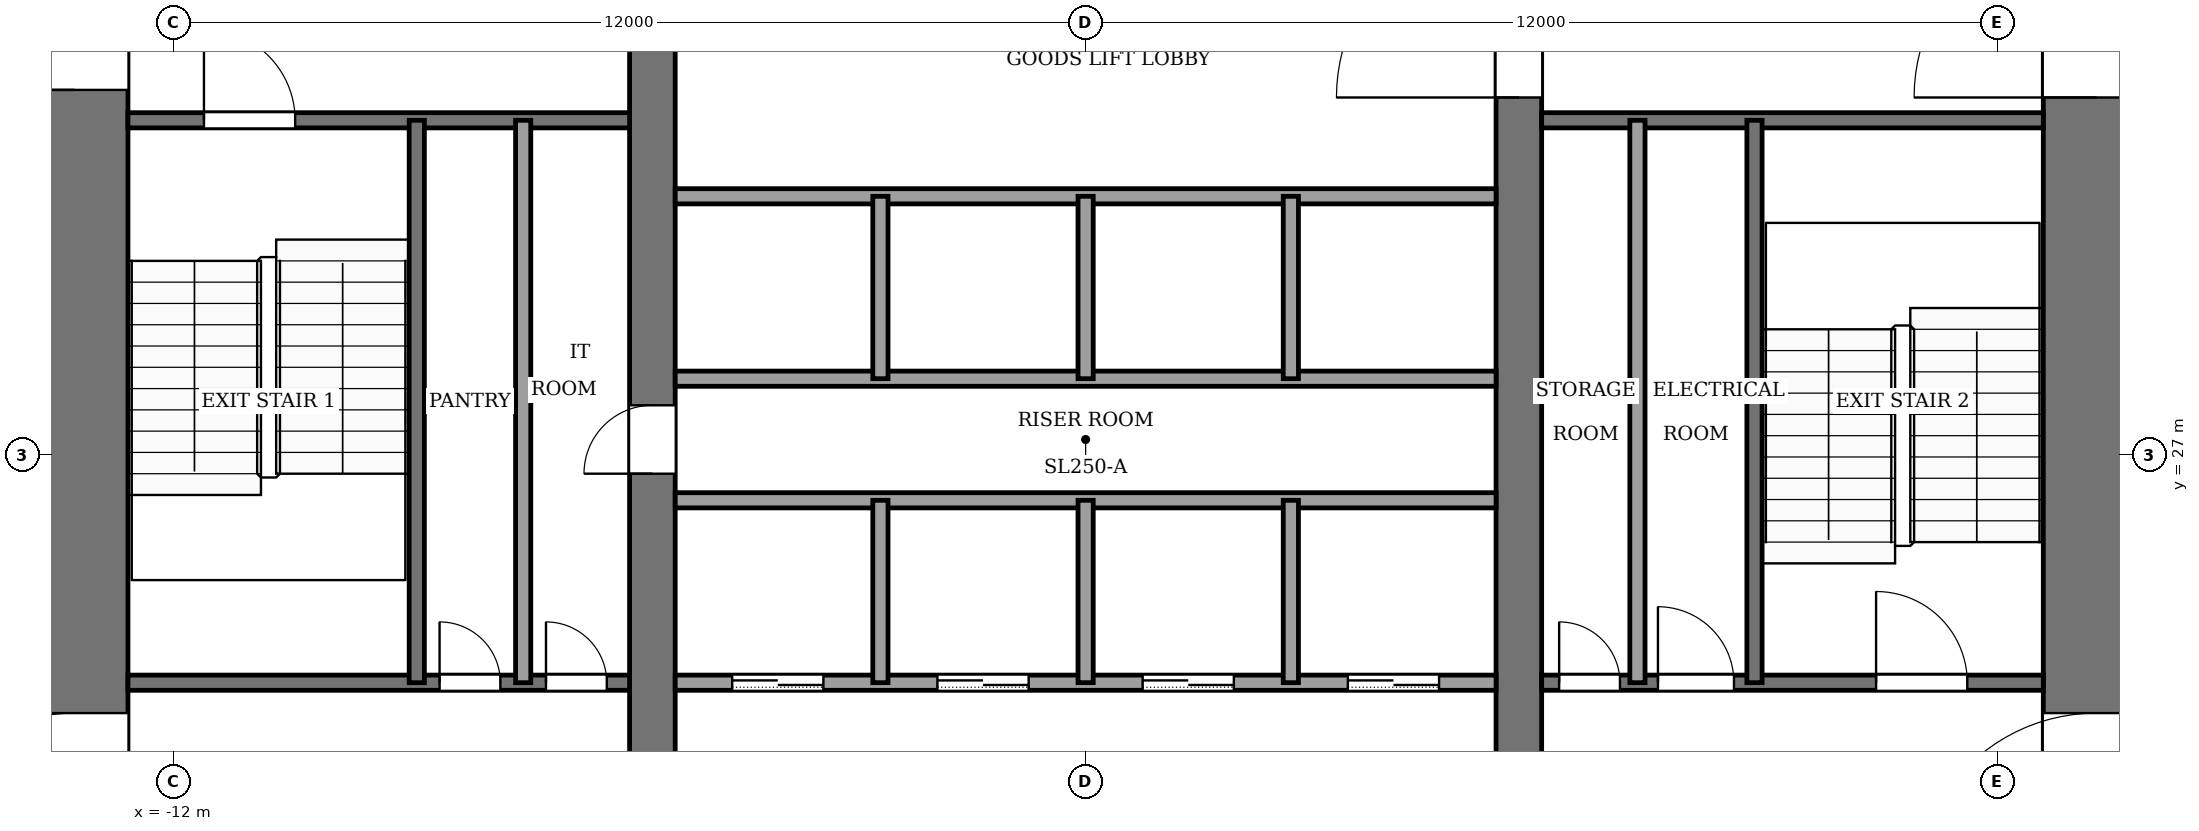
"""IFC4 building model, lengths in metres.
Left out: names, types, materials, properties, quantities, classifications, styles, units other than length and angle.
Written with IfcOpenShell. Run it as: python <this file> out.ifc"""

import sys

from ifc_helpers import new_model, si_unit, direction, frame, frame_2d, origin, place, context, subcontext, project, spatial, rectangle, extrude, element, fill, save


model = new_model("IFC4")
c1 = context("Model", 3, precision=1e-05, world=origin(), true_north=direction((0.0, 1.0)))
c2 = subcontext(c1, "Body", "Model", "MODEL_VIEW")
j1 = project(units=[si_unit("LENGTHUNIT", "METRE"), si_unit("PLANEANGLEUNIT", "RADIAN")], contexts=[c1])
p1 = place(None, origin())
s1 = spatial("IfcSite", under=j1, at=p1, CompositionType="ELEMENT")
p2 = place(p1, origin())
s2 = spatial("IfcBuilding", under=s1, at=p2, CompositionType="ELEMENT")
p3 = place(p2, frame((0.0, 0.0, 30.0)))
s3 = spatial("IfcBuildingStorey", under=s2, at=p3, CompositionType="ELEMENT", Elevation=30.0)
p4 = place(p3, frame((-13.3, 18.4, -0.13), z_axis=(0.0, 0.0, 1.0), x_axis=(0.0, 1.0, 0.0)))
e1 = element("IfcWall", 1, at=p4, inside=s3, PredefinedType="SHEAR", context=c2, shape_type="SweptSolid", body=[
    extrude(rectangle(XDim=19.2, YDim=1.4, at=frame_2d((9.6, 0.0))), origin(), (0.0, 0.0, 1.0), 4.0),
])
p5 = place(p4, frame((2.8, 0.0, 0.13)))
e2 = element("IfcOpeningElement", 2, at=p5, cuts=e1, PredefinedType="OPENING", context=c2, shape_type="SweptSolid", body=[
    extrude(rectangle(XDim=2.4, YDim=2.4, at=frame_2d((1.2, 1.2))), frame((0.0, 0.71, 0.0), z_axis=(0.0, -1.0, 0.0), x_axis=(1.0, 0.0, 0.0)), (0.0, 0.0, 1.0), 1.42),
])
p6 = place(p4, frame((13.4, 0.0, 0.13)))
e3 = element("IfcOpeningElement", 3, at=p6, cuts=e1, PredefinedType="OPENING", context=c2, shape_type="SweptSolid", body=[
    extrude(rectangle(XDim=1.4, YDim=2.2, at=frame_2d((0.7, 1.1))), frame((0.0, 0.71, 0.0), z_axis=(0.0, -1.0, 0.0), x_axis=(1.0, 0.0, 0.0)), (0.0, 0.0, 1.0), 1.42),
])
p7 = place(p3, frame((13.3, 18.4, -0.13), z_axis=(0.0, 0.0, 1.0), x_axis=(0.0, 1.0, 0.0)))
e4 = element("IfcWall", 4, at=p7, inside=s3, PredefinedType="SHEAR", context=c2, shape_type="SweptSolid", body=[
    extrude(rectangle(XDim=19.2, YDim=1.4, at=frame_2d((9.6, 0.0))), origin(), (0.0, 0.0, 1.0), 4.0),
])
p8 = place(p7, frame((2.8, 0.0, 0.13)))
e5 = element("IfcOpeningElement", 5, at=p8, cuts=e4, PredefinedType="OPENING", context=c2, shape_type="SweptSolid", body=[
    extrude(rectangle(XDim=2.4, YDim=2.4, at=frame_2d((1.2, 1.2))), frame((0.0, 0.71, 0.0), z_axis=(0.0, -1.0, 0.0), x_axis=(1.0, 0.0, 0.0)), (0.0, 0.0, 1.0), 1.42),
])
p9 = place(p7, frame((13.3, 0.0, 0.13)))
e6 = element("IfcOpeningElement", 6, at=p9, cuts=e4, PredefinedType="OPENING", context=c2, shape_type="SweptSolid", body=[
    extrude(rectangle(XDim=2.4, YDim=2.4, at=frame_2d((1.2, 1.2))), frame((0.0, 0.71, 0.0), z_axis=(0.0, -1.0, 0.0), x_axis=(1.0, 0.0, 0.0)), (0.0, 0.0, 1.0), 1.42),
])
p10 = place(p3, frame((-5.7, 18.4, -0.13), z_axis=(0.0, 0.0, 1.0), x_axis=(0.0, 1.0, 0.0)))
e7 = element("IfcWall", 7, at=p10, inside=s3, PredefinedType="SHEAR", context=c2, shape_type="SweptSolid", body=[
    extrude(rectangle(XDim=19.2, YDim=0.6, at=frame_2d((9.6, 0.0))), origin(), (0.0, 0.0, 1.0), 4.0),
])
p11 = place(p10, frame((8.35, 0.0, 0.13)))
e8 = element("IfcOpeningElement", 8, at=p11, cuts=e7, PredefinedType="OPENING", context=c2, shape_type="SweptSolid", body=[
    extrude(rectangle(XDim=0.9, YDim=2.1, at=frame_2d((0.45, 1.05))), frame((0.0, 0.31, 0.0), z_axis=(0.0, -1.0, 0.0), x_axis=(1.0, 0.0, 0.0)), (0.0, 0.0, 1.0), 0.62),
])
p12 = place(p3, frame((5.7, 18.4, -0.13), z_axis=(0.0, 0.0, 1.0), x_axis=(0.0, 1.0, 0.0)))
e9 = element("IfcWall", 9, at=p12, inside=s3, PredefinedType="SHEAR", context=c2, shape_type="SweptSolid", body=[
    extrude(rectangle(XDim=19.2, YDim=0.6, at=frame_2d((9.6, 0.0))), origin(), (0.0, 0.0, 1.0), 4.0),
])
p13 = place(p12, frame((13.3, 0.0, 0.13)))
e10 = element("IfcOpeningElement", 10, at=p13, cuts=e9, PredefinedType="OPENING", context=c2, shape_type="SweptSolid", body=[
    extrude(rectangle(XDim=2.4, YDim=2.4, at=frame_2d((1.2, 1.2))), frame((0.0, 0.31, 0.0), z_axis=(0.0, -1.0, 0.0), x_axis=(1.0, 0.0, 0.0)), (0.0, 0.0, 1.0), 0.62),
])
p14 = place(p3, frame((-12.6, 24.0, 0.0), z_axis=(0.0, 0.0, 1.0), x_axis=(1.0, 0.0, 0.0)))
e11 = element("IfcWall", 11, at=p14, inside=s3, PredefinedType="PARTITIONING", context=c2, shape_type="SweptSolid", body=[
    extrude(rectangle(XDim=6.6, YDim=0.2, at=frame_2d((3.3, 0.0))), origin(), (0.0, 0.0, 1.0), 3.87),
])
p15 = place(p14, frame((4.1, 0.0, 0.0)))
e12 = element("IfcOpeningElement", 12, at=p15, cuts=e11, PredefinedType="OPENING", context=c2, shape_type="SweptSolid", body=[
    extrude(rectangle(XDim=0.8, YDim=2.1, at=frame_2d((0.4, 1.05))), frame((0.0, 0.11, 0.0), z_axis=(0.0, -1.0, 0.0), x_axis=(1.0, 0.0, 0.0)), (0.0, 0.0, 1.0), 0.22),
])
p16 = place(p14, frame((5.5, 0.0, 0.0)))
e13 = element("IfcOpeningElement", 13, at=p16, cuts=e11, PredefinedType="OPENING", context=c2, shape_type="SweptSolid", body=[
    extrude(rectangle(XDim=0.8, YDim=2.1, at=frame_2d((0.4, 1.05))), frame((0.0, 0.11, 0.0), z_axis=(0.0, -1.0, 0.0), x_axis=(1.0, 0.0, 0.0)), (0.0, 0.0, 1.0), 0.22),
])
p17 = place(p3, frame((-5.4, 24.0, 0.0), z_axis=(0.0, 0.0, 1.0), x_axis=(1.0, 0.0, 0.0)))
e14 = element("IfcWall", 14, at=p17, inside=s3, PredefinedType="PARTITIONING", context=c2, shape_type="SweptSolid", body=[
    extrude(rectangle(XDim=10.8, YDim=0.2, at=frame_2d((5.4, 0.0))), origin(), (0.0, 0.0, 1.0), 3.87),
])
p18 = place(p17, frame((0.75, 0.0, 0.0)))
e15 = element("IfcOpeningElement", 15, at=p18, cuts=e14, PredefinedType="OPENING", context=c2, shape_type="SweptSolid", body=[
    extrude(rectangle(XDim=1.2, YDim=2.2, at=frame_2d((0.6, 1.1))), frame((0.0, 0.11, 0.0), z_axis=(0.0, -1.0, 0.0), x_axis=(1.0, 0.0, 0.0)), (0.0, 0.0, 1.0), 0.22),
])
p19 = place(p17, frame((3.45, 0.0, 0.0)))
e16 = element("IfcOpeningElement", 16, at=p19, cuts=e14, PredefinedType="OPENING", context=c2, shape_type="SweptSolid", body=[
    extrude(rectangle(XDim=1.2, YDim=2.2, at=frame_2d((0.6, 1.1))), frame((0.0, 0.11, 0.0), z_axis=(0.0, -1.0, 0.0), x_axis=(1.0, 0.0, 0.0)), (0.0, 0.0, 1.0), 0.22),
])
p20 = place(p17, frame((6.15, 0.0, 0.0)))
e17 = element("IfcOpeningElement", 17, at=p20, cuts=e14, PredefinedType="OPENING", context=c2, shape_type="SweptSolid", body=[
    extrude(rectangle(XDim=1.2, YDim=2.2, at=frame_2d((0.6, 1.1))), frame((0.0, 0.11, 0.0), z_axis=(0.0, -1.0, 0.0), x_axis=(1.0, 0.0, 0.0)), (0.0, 0.0, 1.0), 0.22),
])
p21 = place(p17, frame((8.85, 0.0, 0.0)))
e18 = element("IfcOpeningElement", 18, at=p21, cuts=e14, PredefinedType="OPENING", context=c2, shape_type="SweptSolid", body=[
    extrude(rectangle(XDim=1.2, YDim=2.2, at=frame_2d((0.6, 1.1))), frame((0.0, 0.11, 0.0), z_axis=(0.0, -1.0, 0.0), x_axis=(1.0, 0.0, 0.0)), (0.0, 0.0, 1.0), 0.22),
])
p22 = place(p3, frame((6.0, 24.0, 0.0), z_axis=(0.0, 0.0, 1.0), x_axis=(1.0, 0.0, 0.0)))
e19 = element("IfcWall", 19, at=p22, inside=s3, PredefinedType="PARTITIONING", context=c2, shape_type="SweptSolid", body=[
    extrude(rectangle(XDim=6.6, YDim=0.2, at=frame_2d((3.3, 0.0))), origin(), (0.0, 0.0, 1.0), 3.87),
])
p23 = place(p22, frame((0.23, 0.0, 0.0)))
e20 = element("IfcOpeningElement", 20, at=p23, cuts=e19, PredefinedType="OPENING", context=c2, shape_type="SweptSolid", body=[
    extrude(rectangle(XDim=0.8, YDim=2.1, at=frame_2d((0.4, 1.05))), frame((0.0, 0.11, 0.0), z_axis=(0.0, -1.0, 0.0), x_axis=(1.0, 0.0, 0.0)), (0.0, 0.0, 1.0), 0.22),
])
p24 = place(p22, frame((1.53, 0.0, 0.0)))
e21 = element("IfcOpeningElement", 21, at=p24, cuts=e19, PredefinedType="OPENING", context=c2, shape_type="SweptSolid", body=[
    extrude(rectangle(XDim=1.0, YDim=2.1, at=frame_2d((0.5, 1.05))), frame((0.0, 0.11, 0.0), z_axis=(0.0, -1.0, 0.0), x_axis=(1.0, 0.0, 0.0)), (0.0, 0.0, 1.0), 0.22),
])
p25 = place(p22, frame((4.4, 0.0, 0.0)))
e22 = element("IfcOpeningElement", 22, at=p25, cuts=e19, PredefinedType="OPENING", context=c2, shape_type="SweptSolid", body=[
    extrude(rectangle(XDim=1.2, YDim=2.2, at=frame_2d((0.6, 1.1))), frame((0.0, 0.11, 0.0), z_axis=(0.0, -1.0, 0.0), x_axis=(1.0, 0.0, 0.0)), (0.0, 0.0, 1.0), 0.22),
])
for number, where, z_axis, x_axis in (
    (23, (-5.4, 26.4, 0.0), (0.0, 0.0, 1.0), (1.0, 0.0, 0.0)),
    (24, (-5.4, 28.0, 0.0), (0.0, 0.0, 1.0), (1.0, 0.0, 0.0)),
    (25, (-5.4, 30.4, 0.0), (0.0, 0.0, 1.0), (1.0, 0.0, 0.0)),
):
    element("IfcWall", number, at=place(p3, frame(where, z_axis=z_axis, x_axis=x_axis)), inside=s3, PredefinedType="PARTITIONING", context=c2, shape_type="SweptSolid", body=[
        extrude(rectangle(XDim=10.8, YDim=0.2, at=frame_2d((5.4, 0.0))), origin(), (0.0, 0.0, 1.0), 3.87),
    ])
p26 = place(p3, frame((-12.6, 31.4, 0.0), z_axis=(0.0, 0.0, 1.0), x_axis=(1.0, 0.0, 0.0)))
e26 = element("IfcWall", 26, at=p26, inside=s3, PredefinedType="PARTITIONING", context=c2, shape_type="SweptSolid", body=[
    extrude(rectangle(XDim=6.6, YDim=0.2, at=frame_2d((3.3, 0.0))), origin(), (0.0, 0.0, 1.0), 3.87),
])
p27 = place(p26, frame((1.0, 0.0, 0.0)))
e27 = element("IfcOpeningElement", 27, at=p27, cuts=e26, PredefinedType="OPENING", context=c2, shape_type="SweptSolid", body=[
    extrude(rectangle(XDim=1.2, YDim=2.2, at=frame_2d((0.6, 1.1))), frame((0.0, 0.11, 0.0), z_axis=(0.0, -1.0, 0.0), x_axis=(1.0, 0.0, 0.0)), (0.0, 0.0, 1.0), 0.22),
])
p28 = place(p3, frame((6.0, 31.4, 0.0), z_axis=(0.0, 0.0, 1.0), x_axis=(1.0, 0.0, 0.0)))
e28 = element("IfcWall", 28, at=p28, inside=s3, PredefinedType="PARTITIONING", context=c2, shape_type="SweptSolid", body=[
    extrude(rectangle(XDim=6.6, YDim=0.2, at=frame_2d((3.3, 0.0))), origin(), (0.0, 0.0, 1.0), 3.87),
])
for number, where, z_axis, x_axis in (
    (29, (-8.8, 24.0, 0.0), (0.0, 0.0, 1.0), (0.0, 1.0, 0.0)),
    (30, (-7.4, 24.0, 0.0), (0.0, 0.0, 1.0), (0.0, 1.0, 0.0)),
):
    element("IfcWall", number, at=place(p3, frame(where, z_axis=z_axis, x_axis=x_axis)), inside=s3, PredefinedType="PARTITIONING", context=c2, shape_type="SweptSolid", body=[
        extrude(rectangle(XDim=7.4, YDim=0.2, at=frame_2d((3.7, 0.0))), origin(), (0.0, 0.0, 1.0), 3.87),
    ])
for number, where, z_axis, x_axis in (
    (31, (-2.7, 24.0, 0.0), (0.0, 0.0, 1.0), (0.0, 1.0, 0.0)),
    (32, (-2.7, 28.0, 0.0), (0.0, 0.0, 1.0), (0.0, 1.0, 0.0)),
    (33, (0.0, 24.0, 0.0), (0.0, 0.0, 1.0), (0.0, 1.0, 0.0)),
    (34, (0.0, 28.0, 0.0), (0.0, 0.0, 1.0), (0.0, 1.0, 0.0)),
    (35, (2.7, 24.0, 0.0), (0.0, 0.0, 1.0), (0.0, 1.0, 0.0)),
    (36, (2.7, 28.0, 0.0), (0.0, 0.0, 1.0), (0.0, 1.0, 0.0)),
):
    element("IfcWall", number, at=place(p3, frame(where, z_axis=z_axis, x_axis=x_axis)), inside=s3, PredefinedType="PARTITIONING", context=c2, shape_type="SweptSolid", body=[
        extrude(rectangle(XDim=2.4, YDim=0.2, at=frame_2d((1.2, 0.0))), origin(), (0.0, 0.0, 1.0), 3.87),
    ])
for number, where, z_axis, x_axis in (
    (37, (7.26, 24.0, 0.0), (0.0, 0.0, 1.0), (0.0, 1.0, 0.0)),
    (38, (8.8, 24.0, 0.0), (0.0, 0.0, 1.0), (0.0, 1.0, 0.0)),
):
    element("IfcWall", number, at=place(p3, frame(where, z_axis=z_axis, x_axis=x_axis)), inside=s3, PredefinedType="PARTITIONING", context=c2, shape_type="SweptSolid", body=[
        extrude(rectangle(XDim=7.4, YDim=0.2, at=frame_2d((3.7, 0.0))), origin(), (0.0, 0.0, 1.0), 3.87),
    ])
p29 = place(p18, origin())
e39 = element("IfcDoor", 39, at=p29, inside=s3, OperationType="SLIDING_TO_LEFT", PredefinedType="DOOR", context=c2, shape_type="SweptSolid", body=[
    extrude(rectangle(XDim=1.2, YDim=2.2, at=frame_2d((0.6, 1.1))), frame((0.0, 0.025, 0.0), z_axis=(0.0, -1.0, 0.0), x_axis=(1.0, 0.0, 0.0)), (0.0, 0.0, 1.0), 0.05),
])
fill(e15, e39)
p30 = place(p19, origin())
e40 = element("IfcDoor", 40, at=p30, inside=s3, OperationType="SLIDING_TO_LEFT", PredefinedType="DOOR", context=c2, shape_type="SweptSolid", body=[
    extrude(rectangle(XDim=1.2, YDim=2.2, at=frame_2d((0.6, 1.1))), frame((0.0, 0.025, 0.0), z_axis=(0.0, -1.0, 0.0), x_axis=(1.0, 0.0, 0.0)), (0.0, 0.0, 1.0), 0.05),
])
fill(e16, e40)
p31 = place(p20, origin())
e41 = element("IfcDoor", 41, at=p31, inside=s3, OperationType="SLIDING_TO_LEFT", PredefinedType="DOOR", context=c2, shape_type="SweptSolid", body=[
    extrude(rectangle(XDim=1.2, YDim=2.2, at=frame_2d((0.6, 1.1))), frame((0.0, 0.025, 0.0), z_axis=(0.0, -1.0, 0.0), x_axis=(1.0, 0.0, 0.0)), (0.0, 0.0, 1.0), 0.05),
])
fill(e17, e41)
p32 = place(p21, origin())
e42 = element("IfcDoor", 42, at=p32, inside=s3, OperationType="SLIDING_TO_LEFT", PredefinedType="DOOR", context=c2, shape_type="SweptSolid", body=[
    extrude(rectangle(XDim=1.2, YDim=2.2, at=frame_2d((0.6, 1.1))), frame((0.0, 0.025, 0.0), z_axis=(0.0, -1.0, 0.0), x_axis=(1.0, 0.0, 0.0)), (0.0, 0.0, 1.0), 0.05),
])
fill(e18, e42)
p33 = place(p15, origin())
e43 = element("IfcDoor", 43, at=p33, inside=s3, OperationType="SINGLE_SWING_LEFT", PredefinedType="DOOR", context=c2, shape_type="SweptSolid", body=[
    extrude(rectangle(XDim=0.8, YDim=2.1, at=frame_2d((0.4, 1.05))), frame((0.0, 0.025, 0.0), z_axis=(0.0, -1.0, 0.0), x_axis=(1.0, 0.0, 0.0)), (0.0, 0.0, 1.0), 0.05),
])
fill(e12, e43)
p34 = place(p16, origin())
e44 = element("IfcDoor", 44, at=p34, inside=s3, OperationType="SINGLE_SWING_RIGHT", PredefinedType="DOOR", context=c2, shape_type="SweptSolid", body=[
    extrude(rectangle(XDim=0.8, YDim=2.1, at=frame_2d((0.4, 1.05))), frame((0.0, 0.025, 0.0), z_axis=(0.0, -1.0, 0.0), x_axis=(1.0, 0.0, 0.0)), (0.0, 0.0, 1.0), 0.05),
])
fill(e13, e44)
p35 = place(p23, origin())
e45 = element("IfcDoor", 45, at=p35, inside=s3, OperationType="SINGLE_SWING_RIGHT", PredefinedType="DOOR", context=c2, shape_type="SweptSolid", body=[
    extrude(rectangle(XDim=0.8, YDim=2.1, at=frame_2d((0.4, 1.05))), frame((0.0, 0.025, 0.0), z_axis=(0.0, -1.0, 0.0), x_axis=(1.0, 0.0, 0.0)), (0.0, 0.0, 1.0), 0.05),
])
fill(e20, e45)
p36 = place(p24, origin())
e46 = element("IfcDoor", 46, at=p36, inside=s3, OperationType="SINGLE_SWING_LEFT", PredefinedType="DOOR", context=c2, shape_type="SweptSolid", body=[
    extrude(rectangle(XDim=1.0, YDim=2.1, at=frame_2d((0.5, 1.05))), frame((0.0, 0.025, 0.0), z_axis=(0.0, -1.0, 0.0), x_axis=(1.0, 0.0, 0.0)), (0.0, 0.0, 1.0), 0.05),
])
fill(e21, e46)
p37 = place(p11, origin())
e47 = element("IfcDoor", 47, at=p37, inside=s3, OperationType="SINGLE_SWING_RIGHT", PredefinedType="DOOR", context=c2, shape_type="SweptSolid", body=[
    extrude(rectangle(XDim=0.9, YDim=2.1, at=frame_2d((0.45, 1.05))), frame((0.0, 0.025, 0.0), z_axis=(0.0, -1.0, 0.0), x_axis=(1.0, 0.0, 0.0)), (0.0, 0.0, 1.0), 0.05),
])
fill(e8, e47)
p38 = place(p27, origin())
e48 = element("IfcDoor", 48, at=p38, inside=s3, OperationType="SINGLE_SWING_RIGHT", PredefinedType="DOOR", context=c2, shape_type="SweptSolid", body=[
    extrude(rectangle(XDim=1.2, YDim=2.2, at=frame_2d((0.6, 1.1))), frame((0.0, 0.025, 0.0), z_axis=(0.0, -1.0, 0.0), x_axis=(1.0, 0.0, 0.0)), (0.0, 0.0, 1.0), 0.05),
])
fill(e27, e48)
p39 = place(p25, origin())
e49 = element("IfcDoor", 49, at=p39, inside=s3, OperationType="SINGLE_SWING_LEFT", PredefinedType="DOOR", context=c2, shape_type="SweptSolid", body=[
    extrude(rectangle(XDim=1.2, YDim=2.2, at=frame_2d((0.6, 1.1))), frame((0.0, 0.025, 0.0), z_axis=(0.0, -1.0, 0.0), x_axis=(1.0, 0.0, 0.0)), (0.0, 0.0, 1.0), 0.05),
])
fill(e22, e49)
p40 = place(p13, origin())
e50 = element("IfcDoor", 50, at=p40, inside=s3, OperationType="DOUBLE_DOOR_SINGLE_SWING", PredefinedType="DOOR", context=c2, shape_type="SweptSolid", body=[
    extrude(rectangle(XDim=2.4, YDim=2.4, at=frame_2d((1.2, 1.2))), frame((0.0, 0.025, 0.0), z_axis=(0.0, -1.0, 0.0), x_axis=(1.0, 0.0, 0.0)), (0.0, 0.0, 1.0), 0.05),
])
fill(e10, e50)
p41 = place(p5, origin())
e51 = element("IfcDoor", 51, at=p41, inside=s3, OperationType="DOUBLE_DOOR_SINGLE_SWING", PredefinedType="DOOR", context=c2, shape_type="SweptSolid", body=[
    extrude(rectangle(XDim=2.4, YDim=2.4, at=frame_2d((1.2, 1.2))), frame((0.0, 0.025, 0.0), z_axis=(0.0, -1.0, 0.0), x_axis=(1.0, 0.0, 0.0)), (0.0, 0.0, 1.0), 0.05),
])
fill(e2, e51)
p42 = place(p8, origin())
e52 = element("IfcDoor", 52, at=p42, inside=s3, OperationType="DOUBLE_DOOR_SINGLE_SWING", PredefinedType="DOOR", context=c2, shape_type="SweptSolid", body=[
    extrude(rectangle(XDim=2.4, YDim=2.4, at=frame_2d((1.2, 1.2))), frame((0.0, 0.025, 0.0), z_axis=(0.0, -1.0, 0.0), x_axis=(1.0, 0.0, 0.0)), (0.0, 0.0, 1.0), 0.05),
])
fill(e5, e52)
p43 = place(p9, origin())
e53 = element("IfcDoor", 53, at=p43, inside=s3, OperationType="DOUBLE_DOOR_SINGLE_SWING", PredefinedType="DOOR", context=c2, shape_type="SweptSolid", body=[
    extrude(rectangle(XDim=2.4, YDim=2.4, at=frame_2d((1.2, 1.2))), frame((0.0, 0.025, 0.0), z_axis=(0.0, -1.0, 0.0), x_axis=(1.0, 0.0, 0.0)), (0.0, 0.0, 1.0), 0.05),
])
fill(e6, e53)
p44 = place(p6, origin())
e54 = element("IfcDoor", 54, at=p44, inside=s3, OperationType="SINGLE_SWING_RIGHT", PredefinedType="DOOR", context=c2, shape_type="SweptSolid", body=[
    extrude(rectangle(XDim=1.4, YDim=2.2, at=frame_2d((0.7, 1.1))), frame((0.0, 0.025, 0.0), z_axis=(0.0, -1.0, 0.0), x_axis=(1.0, 0.0, 0.0)), (0.0, 0.0, 1.0), 0.05),
])
fill(e3, e54)
save(model, sys.argv[1])
